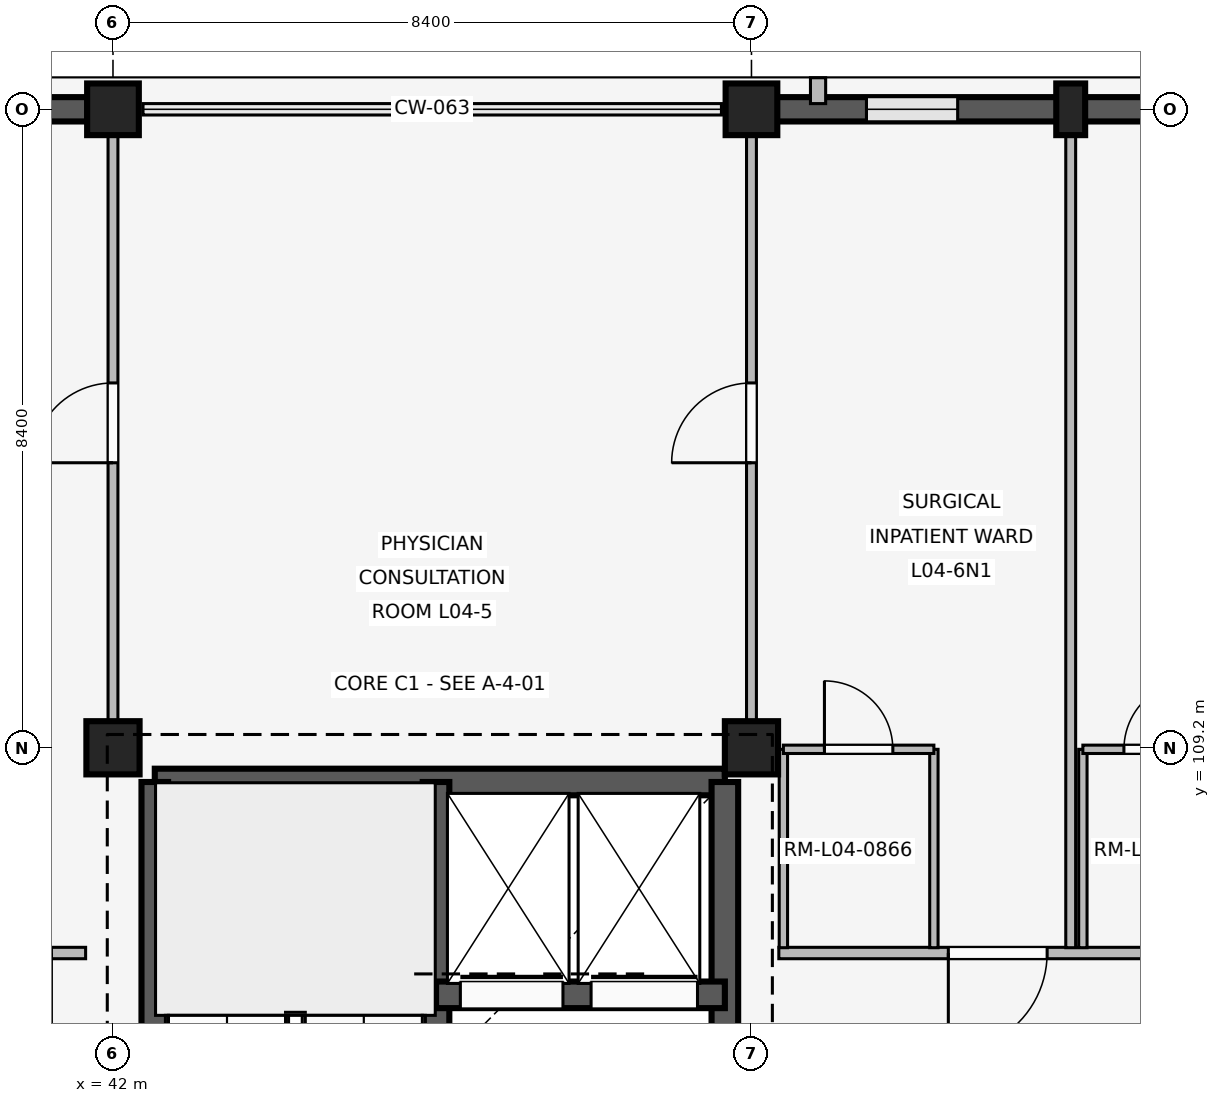
"""IFC4 building model, lengths in metres.
Left out: names, types, materials, properties, quantities, classifications, styles, units other than length and angle.
Written with IfcOpenShell. Run it as: python <this file> out.ifc"""

import sys

from ifc_helpers import new_model, si_unit, direction, frame, frame_2d, origin, origin_2d, place, context, subcontext, project, spatial, rectangle, extrude, element, fill, save


model = new_model("IFC4")
c1 = context("Model", 3, precision=1e-05, world=origin(), true_north=direction((0.0, 1.0)))
c2 = subcontext(c1, "Body", "Model", "MODEL_VIEW")
j1 = project(units=[si_unit("LENGTHUNIT", "METRE"), si_unit("PLANEANGLEUNIT", "RADIAN")], contexts=[c1])
p1 = place(None, origin())
s1 = spatial("IfcSite", under=j1, at=p1, CompositionType="ELEMENT")
p2 = place(p1, origin())
s2 = spatial("IfcBuilding", under=s1, at=p2, CompositionType="ELEMENT")
p3 = place(p2, frame((0.0, 0.0, 16.2)))
s3 = spatial("IfcBuildingStorey", under=s2, at=p3, CompositionType="ELEMENT", Elevation=16.2)
p4 = place(p3, frame((42.0, 109.2, 0.0), z_axis=(0.0, 0.0, 1.0), x_axis=(1.0, 0.0, 0.0)))
e1 = element("IfcColumn", 1, at=p4, inside=s3, PredefinedType="COLUMN", context=c2, shape_type="SweptSolid", body=[
    extrude(rectangle(XDim=0.7, YDim=0.7, at=origin_2d()), origin(), (0.0, 0.0, 1.0), 4.2),
])
p5 = place(p3, frame((42.0, 117.6, 0.0), z_axis=(0.0, 0.0, 1.0), x_axis=(1.0, 0.0, 0.0)))
e2 = element("IfcColumn", 2, at=p5, inside=s3, PredefinedType="COLUMN", context=c2, shape_type="SweptSolid", body=[
    extrude(rectangle(XDim=0.68, YDim=0.68, at=origin_2d()), origin(), (0.0, 0.0, 1.0), 4.2),
])
p6 = place(p3, frame((50.4, 109.2, 0.0), z_axis=(0.0, 0.0, 1.0), x_axis=(1.0, 0.0, 0.0)))
e3 = element("IfcColumn", 3, at=p6, inside=s3, PredefinedType="COLUMN", context=c2, shape_type="SweptSolid", body=[
    extrude(rectangle(XDim=0.7, YDim=0.7, at=origin_2d()), origin(), (0.0, 0.0, 1.0), 4.2),
])
p7 = place(p3, frame((50.4, 117.6, 0.0), z_axis=(0.0, 0.0, 1.0), x_axis=(1.0, 0.0, 0.0)))
e4 = element("IfcColumn", 4, at=p7, inside=s3, PredefinedType="COLUMN", context=c2, shape_type="SweptSolid", body=[
    extrude(rectangle(XDim=0.68, YDim=0.68, at=origin_2d()), origin(), (0.0, 0.0, 1.0), 4.2),
])
p8 = place(p3, frame((54.6, 117.6, 0.0), z_axis=(0.0, 0.0, 1.0), x_axis=(1.0, 0.0, 0.0)))
e5 = element("IfcColumn", 5, at=p8, inside=s3, PredefinedType="PILASTER", context=c2, shape_type="SweptSolid", body=[
    extrude(rectangle(XDim=0.38, YDim=0.68, at=origin_2d()), origin(), (0.0, 0.0, 1.0), 4.2),
])
p9 = place(p3, frame((33.935, 117.6, 0.0), z_axis=(0.0, 0.0, 1.0), x_axis=(1.0, 0.0, 0.0)))
e6 = element("IfcWall", 6, at=p9, inside=s3, PredefinedType="SOLIDWALL", context=c2, shape_type="SweptSolid", body=[
    extrude(rectangle(XDim=7.73, YDim=0.32, at=frame_2d((3.865, 0.0))), origin(), (0.0, 0.0, 1.0), 3.32),
])
p10 = place(p9, frame((1.018, 0.0, 0.85)))
e7 = element("IfcOpeningElement", 7, at=p10, cuts=e6, PredefinedType="OPENING", context=c2, shape_type="SweptSolid", body=[
    extrude(rectangle(XDim=1.52, YDim=1.65, at=frame_2d((0.76, 0.825))), frame((0.0, 0.17, 0.0), z_axis=(0.0, -1.0, 0.0), x_axis=(1.0, 0.0, 0.0)), (0.0, 0.0, 1.0), 0.34),
])
p11 = place(p9, frame((5.192, 0.0, 0.85)))
e8 = element("IfcOpeningElement", 8, at=p11, cuts=e6, PredefinedType="OPENING", context=c2, shape_type="SweptSolid", body=[
    extrude(rectangle(XDim=1.52, YDim=1.65, at=frame_2d((0.76, 0.825))), frame((0.0, 0.17, 0.0), z_axis=(0.0, -1.0, 0.0), x_axis=(1.0, 0.0, 0.0)), (0.0, 0.0, 1.0), 0.34),
])
p12 = place(p3, frame((50.735, 117.6, 0.0), z_axis=(0.0, 0.0, 1.0), x_axis=(1.0, 0.0, 0.0)))
e9 = element("IfcWall", 9, at=p12, inside=s3, PredefinedType="SOLIDWALL", context=c2, shape_type="SweptSolid", body=[
    extrude(rectangle(XDim=7.73, YDim=0.32, at=frame_2d((3.865, 0.0))), origin(), (0.0, 0.0, 1.0), 3.32),
])
p13 = place(p12, frame((1.178, 0.0, 0.85)))
e10 = element("IfcOpeningElement", 10, at=p13, cuts=e9, PredefinedType="OPENING", context=c2, shape_type="SweptSolid", body=[
    extrude(rectangle(XDim=1.2, YDim=1.55, at=frame_2d((0.6, 0.775))), frame((0.0, 0.17, 0.0), z_axis=(0.0, -1.0, 0.0), x_axis=(1.0, 0.0, 0.0)), (0.0, 0.0, 1.0), 0.34),
])
p14 = place(p12, frame((5.352, 0.0, 0.85)))
e11 = element("IfcOpeningElement", 11, at=p14, cuts=e9, PredefinedType="OPENING", context=c2, shape_type="SweptSolid", body=[
    extrude(rectangle(XDim=1.2, YDim=1.55, at=frame_2d((0.6, 0.775))), frame((0.0, 0.17, 0.0), z_axis=(0.0, -1.0, 0.0), x_axis=(1.0, 0.0, 0.0)), (0.0, 0.0, 1.0), 0.34),
])
p15 = place(p3, frame((51.276, 117.675, 0.0), z_axis=(0.0, 0.0, 1.0), x_axis=(0.0, 1.0, 0.0)))
e12 = element("IfcWall", 12, at=p15, inside=s3, PredefinedType="ELEMENTEDWALL", context=c2, shape_type="SweptSolid", body=[
    extrude(rectangle(XDim=0.34, YDim=0.2, at=frame_2d((0.17, 0.0))), origin(), (0.0, 0.0, 1.0), 3.3),
])
p16 = place(p3, frame((42.55, 108.75, 0.0), z_axis=(0.0, 0.0, 1.0), x_axis=(1.0, 0.0, 0.0)))
e13 = element("IfcWall", 13, at=p16, inside=s3, PredefinedType="SHEAR", context=c2, shape_type="SweptSolid", body=[
    extrude(rectangle(XDim=7.5, YDim=0.35, at=frame_2d((3.75, 0.0))), origin(), (0.0, 0.0, 1.0), 3.92),
])
p17 = place(p3, frame((42.55, 101.2, 0.0), z_axis=(0.0, 0.0, 1.0), x_axis=(0.0, 1.0, 0.0)))
e14 = element("IfcWall", 14, at=p17, inside=s3, PredefinedType="SHEAR", context=c2, shape_type="SweptSolid", body=[
    extrude(rectangle(XDim=7.55, YDim=0.35, at=frame_2d((3.775, 0.0))), origin(), (0.0, 0.0, 1.0), 3.92),
])
p18 = place(p17, frame((0.28, 0.0, 0.0)))
e15 = element("IfcOpeningElement", 15, at=p18, cuts=e14, PredefinedType="OPENING", context=c2, shape_type="SweptSolid", body=[
    extrude(rectangle(XDim=1.0, YDim=2.15, at=frame_2d((0.5, 1.075))), frame((0.0, 0.185, 0.0), z_axis=(0.0, -1.0, 0.0), x_axis=(1.0, 0.0, 0.0)), (0.0, 0.0, 1.0), 0.37),
])
p19 = place(p3, frame((50.05, 101.2, 0.0), z_axis=(0.0, 0.0, 1.0), x_axis=(0.0, 1.0, 0.0)))
e16 = element("IfcWall", 16, at=p19, inside=s3, PredefinedType="SHEAR", context=c2, shape_type="SweptSolid", body=[
    extrude(rectangle(XDim=7.55, YDim=0.35, at=frame_2d((3.775, 0.0))), origin(), (0.0, 0.0, 1.0), 3.92),
])
p20 = place(p19, frame((2.4, 0.0, 0.0)))
e17 = element("IfcOpeningElement", 17, at=p20, cuts=e16, PredefinedType="OPENING", context=c2, shape_type="SweptSolid", body=[
    extrude(rectangle(XDim=1.2, YDim=2.2, at=frame_2d((0.6, 1.1))), frame((0.0, 0.185, 0.0), z_axis=(0.0, -1.0, 0.0), x_axis=(1.0, 0.0, 0.0)), (0.0, 0.0, 1.0), 0.37),
])
p21 = place(p3, frame((46.25, 101.2, 0.0), z_axis=(0.0, 0.0, 1.0), x_axis=(0.0, 1.0, 0.0)))
e18 = element("IfcWall", 18, at=p21, inside=s3, PredefinedType="SHEAR", context=c2, shape_type="SweptSolid", body=[
    extrude(rectangle(XDim=7.55, YDim=0.35, at=frame_2d((3.775, 0.0))), origin(), (0.0, 0.0, 1.0), 3.92),
])
p22 = place(p21, frame((0.28, 0.0, 0.0)))
e19 = element("IfcOpeningElement", 19, at=p22, cuts=e18, PredefinedType="OPENING", context=c2, shape_type="SweptSolid", body=[
    extrude(rectangle(XDim=1.0, YDim=2.15, at=frame_2d((0.5, 1.075))), frame((0.0, 0.185, 0.0), z_axis=(0.0, -1.0, 0.0), x_axis=(1.0, 0.0, 0.0)), (0.0, 0.0, 1.0), 0.37),
])
p23 = place(p3, frame((46.25, 105.95, 0.0), z_axis=(0.0, 0.0, 1.0), x_axis=(1.0, 0.0, 0.0)))
e20 = element("IfcWall", 20, at=p23, inside=s3, PredefinedType="SHEAR", context=c2, shape_type="SweptSolid", body=[
    extrude(rectangle(XDim=3.8, YDim=0.35, at=frame_2d((1.9, 0.0))), origin(), (0.0, 0.0, 1.0), 3.92),
])
p24 = place(p23, frame((0.32, 0.0, 0.0)))
e21 = element("IfcOpeningElement", 21, at=p24, cuts=e20, PredefinedType="OPENING", context=c2, shape_type="SweptSolid", body=[
    extrude(rectangle(XDim=1.35, YDim=2.25, at=frame_2d((0.675, 1.125))), frame((0.0, 0.185, 0.0), z_axis=(0.0, -1.0, 0.0), x_axis=(1.0, 0.0, 0.0)), (0.0, 0.0, 1.0), 0.37),
])
p25 = place(p23, frame((2.04, 0.0, 0.0)))
e22 = element("IfcOpeningElement", 22, at=p25, cuts=e20, PredefinedType="OPENING", context=c2, shape_type="SweptSolid", body=[
    extrude(rectangle(XDim=1.4, YDim=2.25, at=frame_2d((0.7, 1.125))), frame((0.0, 0.185, 0.0), z_axis=(0.0, -1.0, 0.0), x_axis=(1.0, 0.0, 0.0)), (0.0, 0.0, 1.0), 0.37),
])
p26 = place(p3, frame((41.64, 106.5, 0.0), z_axis=(0.0, 0.0, 1.0), x_axis=(-1.0, 0.0, 0.0)))
e23 = element("IfcWall", 23, at=p26, inside=s3, PredefinedType="PARTITIONING", context=c2, shape_type="SweptSolid", body=[
    extrude(rectangle(XDim=7.96, YDim=0.15, at=frame_2d((3.98, 0.0))), origin(), (0.0, 0.0, 1.0), 3.3),
])
p27 = place(p26, frame((0.45, 0.0, 0.0)))
e24 = element("IfcOpeningElement", 24, at=p27, cuts=e23, PredefinedType="OPENING", context=c2, shape_type="SweptSolid", body=[
    extrude(rectangle(XDim=1.3, YDim=2.25, at=frame_2d((0.65, 1.125))), frame((0.0, 0.085, 0.0), z_axis=(0.0, -1.0, 0.0), x_axis=(1.0, 0.0, 0.0)), (0.0, 0.0, 1.0), 0.17),
])
p28 = place(p26, frame((4.15, 0.0, 0.0)))
e25 = element("IfcOpeningElement", 25, at=p28, cuts=e23, PredefinedType="OPENING", context=c2, shape_type="SweptSolid", body=[
    extrude(rectangle(XDim=1.3, YDim=2.25, at=frame_2d((0.65, 1.125))), frame((0.0, 0.085, 0.0), z_axis=(0.0, -1.0, 0.0), x_axis=(1.0, 0.0, 0.0)), (0.0, 0.0, 1.0), 0.17),
])
p29 = place(p3, frame((42.0, 109.55, 0.0), z_axis=(0.0, 0.0, 1.0), x_axis=(0.0, 1.0, 0.0)))
e26 = element("IfcWall", 26, at=p29, inside=s3, PredefinedType="PARTITIONING", context=c2, shape_type="SweptSolid", body=[
    extrude(rectangle(XDim=7.91, YDim=0.13, at=frame_2d((3.955, 0.0))), origin(), (0.0, 0.0, 1.0), 3.3),
])
p30 = place(p29, frame((3.4, 0.0, 0.0)))
e27 = element("IfcOpeningElement", 27, at=p30, cuts=e26, PredefinedType="OPENING", context=c2, shape_type="SweptSolid", body=[
    extrude(rectangle(XDim=1.05, YDim=2.2, at=frame_2d((0.525, 1.1))), frame((0.0, 0.075, 0.0), z_axis=(0.0, -1.0, 0.0), x_axis=(1.0, 0.0, 0.0)), (0.0, 0.0, 1.0), 0.15),
])
p31 = place(p3, frame((50.4, 109.55, 0.0), z_axis=(0.0, 0.0, 1.0), x_axis=(0.0, 1.0, 0.0)))
e28 = element("IfcWall", 28, at=p31, inside=s3, PredefinedType="PARTITIONING", context=c2, shape_type="SweptSolid", body=[
    extrude(rectangle(XDim=7.91, YDim=0.13, at=frame_2d((3.955, 0.0))), origin(), (0.0, 0.0, 1.0), 3.3),
])
p32 = place(p31, frame((3.4, 0.0, 0.0)))
e29 = element("IfcOpeningElement", 29, at=p32, cuts=e28, PredefinedType="OPENING", context=c2, shape_type="SweptSolid", body=[
    extrude(rectangle(XDim=1.05, YDim=2.2, at=frame_2d((0.525, 1.1))), frame((0.0, 0.075, 0.0), z_axis=(0.0, -1.0, 0.0), x_axis=(1.0, 0.0, 0.0)), (0.0, 0.0, 1.0), 0.15),
])
p33 = place(p3, frame((58.72, 106.5, 0.0), z_axis=(0.0, 0.0, 1.0), x_axis=(-1.0, 0.0, 0.0)))
e30 = element("IfcWall", 30, at=p33, inside=s3, PredefinedType="PARTITIONING", context=c2, shape_type="SweptSolid", body=[
    extrude(rectangle(XDim=7.96, YDim=0.15, at=frame_2d((3.98, 0.0))), origin(), (0.0, 0.0, 1.0), 3.3),
])
p34 = place(p33, frame((0.73, 0.0, 0.0)))
e31 = element("IfcOpeningElement", 31, at=p34, cuts=e30, PredefinedType="OPENING", context=c2, shape_type="SweptSolid", body=[
    extrude(rectangle(XDim=1.3, YDim=2.25, at=frame_2d((0.65, 1.125))), frame((0.0, 0.085, 0.0), z_axis=(0.0, -1.0, 0.0), x_axis=(1.0, 0.0, 0.0)), (0.0, 0.0, 1.0), 0.17),
])
p35 = place(p33, frame((4.43, 0.0, 0.0)))
e32 = element("IfcOpeningElement", 32, at=p35, cuts=e30, PredefinedType="OPENING", context=c2, shape_type="SweptSolid", body=[
    extrude(rectangle(XDim=1.3, YDim=2.25, at=frame_2d((0.65, 1.125))), frame((0.0, 0.085, 0.0), z_axis=(0.0, -1.0, 0.0), x_axis=(1.0, 0.0, 0.0)), (0.0, 0.0, 1.0), 0.17),
])
p36 = place(p3, frame((54.6, 106.57, 0.0), z_axis=(0.0, 0.0, 1.0), x_axis=(0.0, 1.0, 0.0)))
e33 = element("IfcWall", 33, at=p36, inside=s3, PredefinedType="PARTITIONING", context=c2, shape_type="SweptSolid", body=[
    extrude(rectangle(XDim=10.93, YDim=0.13, at=frame_2d((5.465, 0.0))), origin(), (0.0, 0.0, 1.0), 3.3),
])
for number, where, z_axis, x_axis in (
    (34, (50.82, 106.57, 0.0), (0.0, 0.0, 1.0), (0.0, 1.0, 0.0)),
    (35, (52.8, 106.57, 0.0), (0.0, 0.0, 1.0), (0.0, 1.0, 0.0)),
):
    element("IfcWall", number, at=place(p3, frame(where, z_axis=z_axis, x_axis=x_axis)), inside=s3, PredefinedType="PARTITIONING", context=c2, shape_type="SweptSolid", body=[
        extrude(rectangle(XDim=2.61, YDim=0.11, at=frame_2d((1.305, 0.0))), origin(), (0.0, 0.0, 1.0), 3.3),
    ])
p37 = place(p3, frame((50.82, 109.18, 0.0), z_axis=(0.0, 0.0, 1.0), x_axis=(1.0, 0.0, 0.0)))
e36 = element("IfcWall", 36, at=p37, inside=s3, PredefinedType="PARTITIONING", context=c2, shape_type="SweptSolid", body=[
    extrude(rectangle(XDim=1.98, YDim=0.11, at=frame_2d((0.99, 0.0))), origin(), (0.0, 0.0, 1.0), 3.3),
])
p38 = place(p37, frame((0.54, 0.0, 0.0)))
e37 = element("IfcOpeningElement", 37, at=p38, cuts=e36, PredefinedType="OPENING", context=c2, shape_type="SweptSolid", body=[
    extrude(rectangle(XDim=0.9, YDim=2.1, at=frame_2d((0.45, 1.05))), frame((0.0, 0.065, 0.0), z_axis=(0.0, -1.0, 0.0), x_axis=(1.0, 0.0, 0.0)), (0.0, 0.0, 1.0), 0.13),
])
p39 = place(p3, frame((54.76, 106.57, 0.0), z_axis=(0.0, 0.0, 1.0), x_axis=(0.0, 1.0, 0.0)))
e38 = element("IfcWall", 38, at=p39, inside=s3, PredefinedType="PARTITIONING", context=c2, shape_type="SweptSolid", body=[
    extrude(rectangle(XDim=2.61, YDim=0.11, at=frame_2d((1.305, 0.0))), origin(), (0.0, 0.0, 1.0), 3.3),
])
p40 = place(p3, frame((54.76, 109.18, 0.0), z_axis=(0.0, 0.0, 1.0), x_axis=(1.0, 0.0, 0.0)))
e39 = element("IfcWall", 39, at=p40, inside=s3, PredefinedType="PARTITIONING", context=c2, shape_type="SweptSolid", body=[
    extrude(rectangle(XDim=1.98, YDim=0.11, at=frame_2d((0.99, 0.0))), origin(), (0.0, 0.0, 1.0), 3.3),
])
p41 = place(p40, frame((0.54, 0.0, 0.0)))
e40 = element("IfcOpeningElement", 40, at=p41, cuts=e39, PredefinedType="OPENING", context=c2, shape_type="SweptSolid", body=[
    extrude(rectangle(XDim=0.9, YDim=2.1, at=frame_2d((0.45, 1.05))), frame((0.0, 0.065, 0.0), z_axis=(0.0, -1.0, 0.0), x_axis=(1.0, 0.0, 0.0)), (0.0, 0.0, 1.0), 0.13),
])
p42 = place(p13, origin())
e41 = element("IfcWindow", 41, at=p42, inside=s3, PartitioningType="SINGLE_PANEL", PredefinedType="WINDOW", context=c2, shape_type="SweptSolid", body=[
    extrude(rectangle(XDim=1.2, YDim=1.55, at=frame_2d((0.6, 0.775))), frame((0.0, 0.03, 0.0), z_axis=(0.0, -1.0, 0.0), x_axis=(1.0, 0.0, 0.0)), (0.0, 0.0, 1.0), 0.06),
])
fill(e10, e41)
p43 = place(p24, origin())
e42 = element("IfcDoor", 42, at=p43, inside=s3, OperationType="SLIDING_TO_LEFT", PredefinedType="DOOR", context=c2, shape_type="SweptSolid", body=[
    extrude(rectangle(XDim=1.35, YDim=2.25, at=frame_2d((0.675, 1.125))), frame((0.0, 0.025, 0.0), z_axis=(0.0, -1.0, 0.0), x_axis=(1.0, 0.0, 0.0)), (0.0, 0.0, 1.0), 0.05),
])
fill(e21, e42)
p44 = place(p25, origin())
e43 = element("IfcDoor", 43, at=p44, inside=s3, OperationType="SLIDING_TO_LEFT", PredefinedType="DOOR", context=c2, shape_type="SweptSolid", body=[
    extrude(rectangle(XDim=1.4, YDim=2.25, at=frame_2d((0.7, 1.125))), frame((0.0, 0.025, 0.0), z_axis=(0.0, -1.0, 0.0), x_axis=(1.0, 0.0, 0.0)), (0.0, 0.0, 1.0), 0.05),
])
fill(e22, e43)
p45 = place(p30, origin())
e44 = element("IfcDoor", 44, at=p45, inside=s3, OperationType="SINGLE_SWING_LEFT", PredefinedType="DOOR", context=c2, shape_type="SweptSolid", body=[
    extrude(rectangle(XDim=1.05, YDim=2.2, at=frame_2d((0.525, 1.1))), frame((0.0, 0.025, 0.0), z_axis=(0.0, -1.0, 0.0), x_axis=(1.0, 0.0, 0.0)), (0.0, 0.0, 1.0), 0.05),
])
fill(e27, e44)
p46 = place(p32, origin())
e45 = element("IfcDoor", 45, at=p46, inside=s3, OperationType="SINGLE_SWING_LEFT", PredefinedType="DOOR", context=c2, shape_type="SweptSolid", body=[
    extrude(rectangle(XDim=1.05, YDim=2.2, at=frame_2d((0.525, 1.1))), frame((0.0, 0.025, 0.0), z_axis=(0.0, -1.0, 0.0), x_axis=(1.0, 0.0, 0.0)), (0.0, 0.0, 1.0), 0.05),
])
fill(e29, e45)
p47 = place(p35, origin())
e46 = element("IfcDoor", 46, at=p47, inside=s3, OperationType="SINGLE_SWING_RIGHT", PredefinedType="DOOR", context=c2, shape_type="SweptSolid", body=[
    extrude(rectangle(XDim=1.3, YDim=2.25, at=frame_2d((0.65, 1.125))), frame((0.0, 0.025, 0.0), z_axis=(0.0, -1.0, 0.0), x_axis=(1.0, 0.0, 0.0)), (0.0, 0.0, 1.0), 0.05),
])
fill(e32, e46)
p48 = place(p38, origin())
e47 = element("IfcDoor", 47, at=p48, inside=s3, OperationType="SINGLE_SWING_LEFT", PredefinedType="DOOR", context=c2, shape_type="SweptSolid", body=[
    extrude(rectangle(XDim=0.9, YDim=2.1, at=frame_2d((0.45, 1.05))), frame((0.0, 0.025, 0.0), z_axis=(0.0, -1.0, 0.0), x_axis=(1.0, 0.0, 0.0)), (0.0, 0.0, 1.0), 0.05),
])
fill(e37, e47)
p49 = place(p41, origin())
e48 = element("IfcDoor", 48, at=p49, inside=s3, OperationType="SINGLE_SWING_RIGHT", PredefinedType="DOOR", context=c2, shape_type="SweptSolid", body=[
    extrude(rectangle(XDim=0.9, YDim=2.1, at=frame_2d((0.45, 1.05))), frame((0.0, 0.025, 0.0), z_axis=(0.0, -1.0, 0.0), x_axis=(1.0, 0.0, 0.0)), (0.0, 0.0, 1.0), 0.05),
])
fill(e40, e48)
save(model, sys.argv[1])
